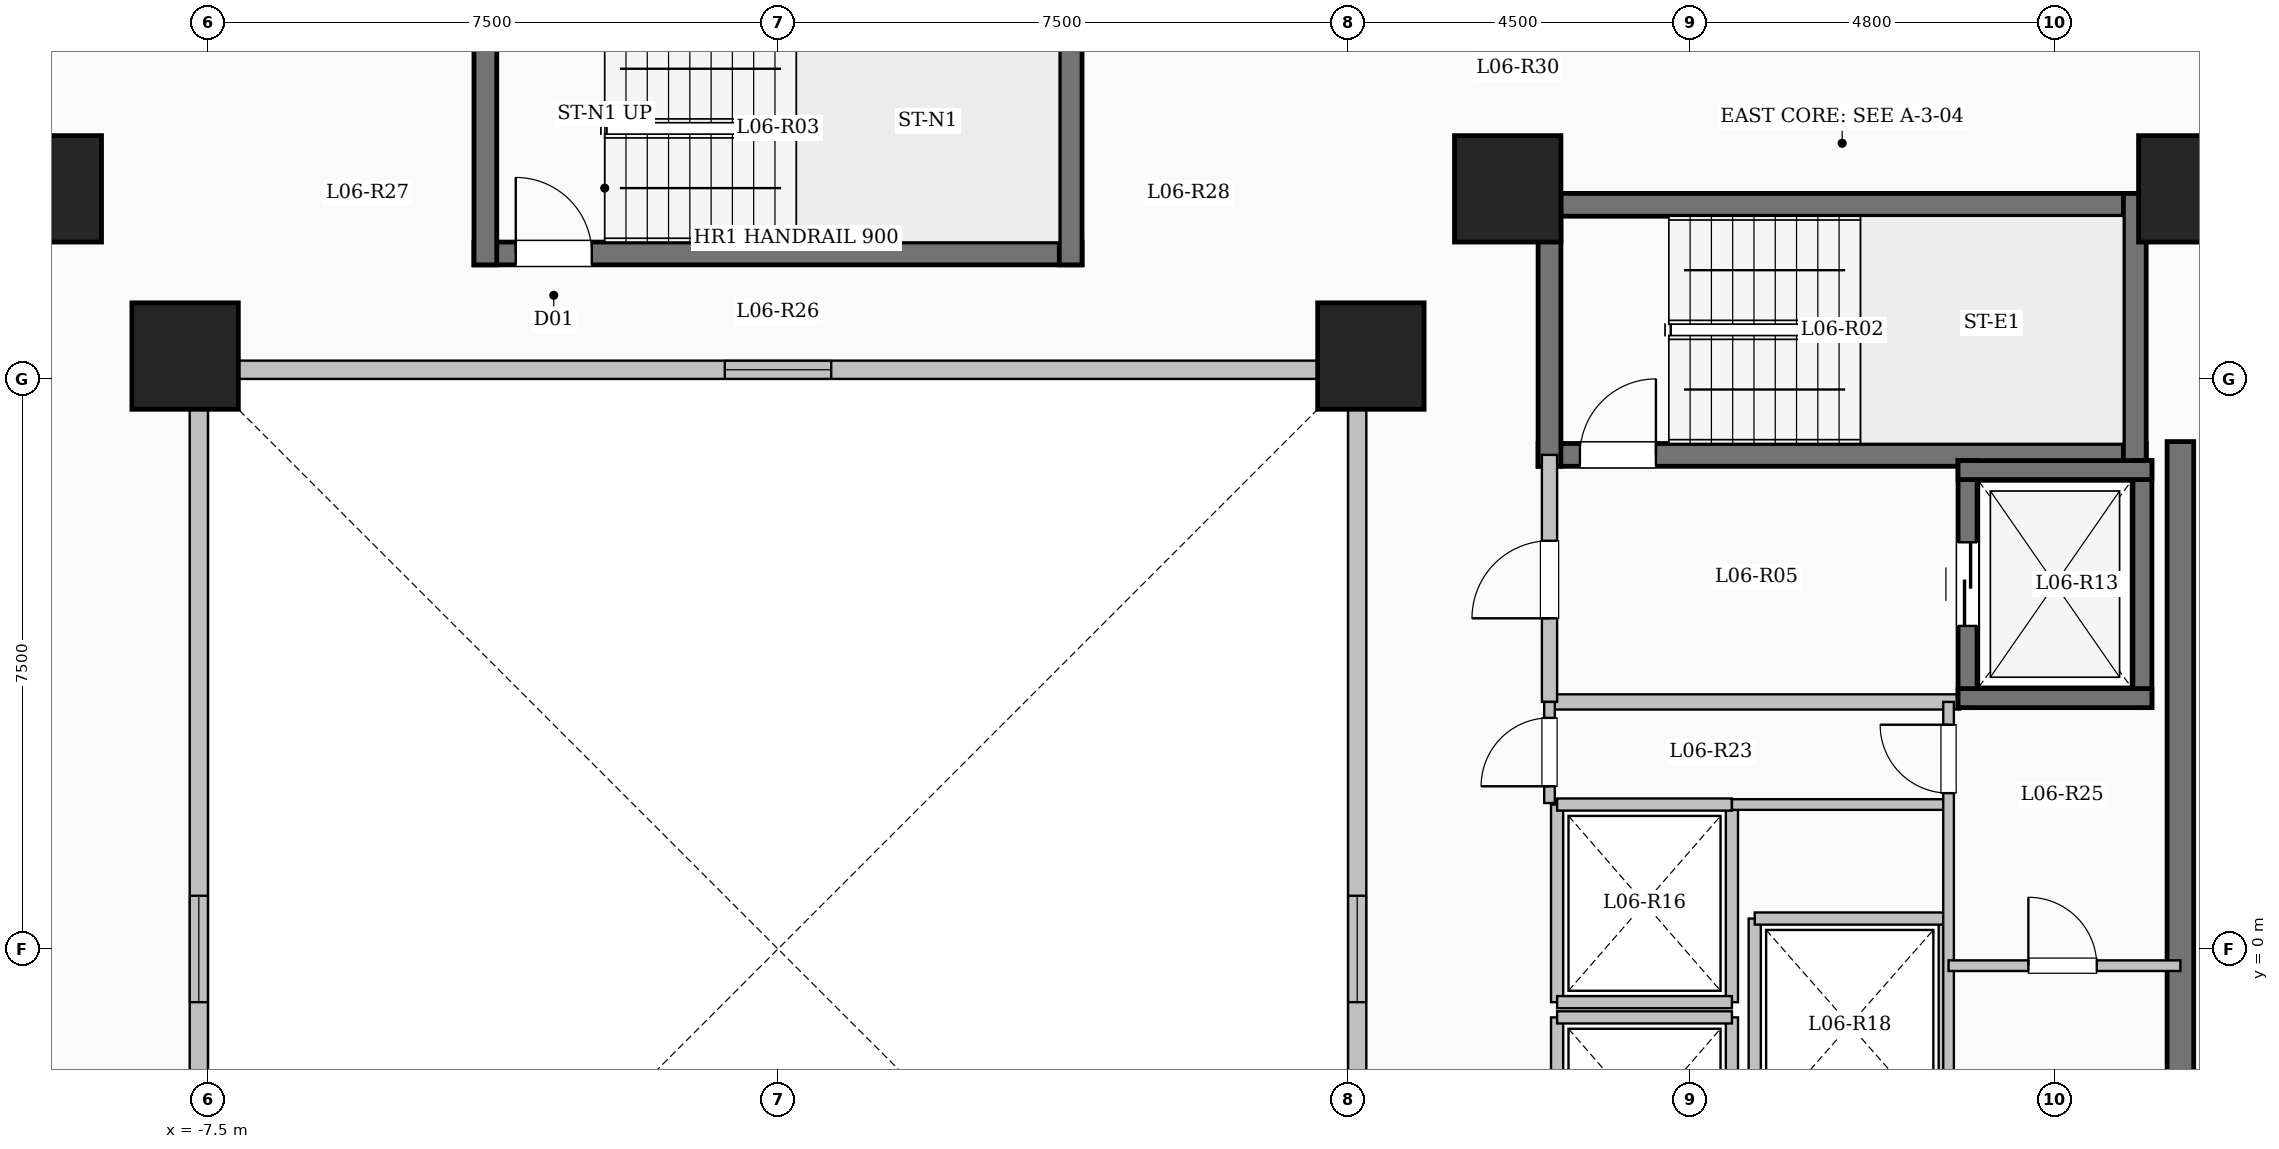
"""IFC4 building model, lengths in metres.
Left out: names, types, materials, properties, quantities, classifications, styles, units other than length and angle.
Written with IfcOpenShell. Run it as: python <this file> out.ifc"""

import sys

from ifc_helpers import new_model, si_unit, direction, frame, frame_2d, origin, origin_2d, place, context, subcontext, project, spatial, rectangle, extrude, element, fill, save


model = new_model("IFC4")
c1 = context("Model", 3, precision=1e-05, world=origin(), true_north=direction((0.0, 1.0)))
c2 = subcontext(c1, "Body", "Model", "MODEL_VIEW")
j1 = project(units=[si_unit("LENGTHUNIT", "METRE"), si_unit("PLANEANGLEUNIT", "RADIAN")], contexts=[c1])
p1 = place(None, origin())
s1 = spatial("IfcSite", under=j1, at=p1, CompositionType="ELEMENT")
p2 = place(p1, origin())
s2 = spatial("IfcBuilding", under=s1, at=p2, CompositionType="ELEMENT")
p3 = place(p2, frame((0.0, 0.0, 27.35)))
s3 = spatial("IfcBuildingStorey", under=s2, at=p3, CompositionType="ELEMENT", Elevation=27.35)
for number, where, z_axis, x_axis in (
    (1, (-7.8, 7.8, 0.0), (0.0, 0.0, 1.0), (1.0, 0.0, 0.0)),
    (2, (7.8, 7.8, 0.0), (0.0, 0.0, 1.0), (1.0, 0.0, 0.0)),
    (3, (-9.6, 10.0, 0.0), (0.0, 0.0, 1.0), (1.0, 0.0, 0.0)),
    (4, (9.6, 10.0, 0.0), (0.0, 0.0, 1.0), (1.0, 0.0, 0.0)),
    (5, (18.6, 10.0, 0.0), (0.0, 0.0, 1.0), (1.0, 0.0, 0.0)),
):
    element("IfcColumn", number, at=place(p3, frame(where, z_axis=z_axis, x_axis=x_axis)), inside=s3, PredefinedType="COLUMN", context=c2, shape_type="SweptSolid", body=[
        extrude(rectangle(XDim=1.4, YDim=1.4, at=origin_2d()), origin(), (0.0, 0.0, 1.0), 3.35),
    ])
p4 = place(p3, frame((7.62, -7.62, 0.0), z_axis=(0.0, 0.0, 1.0), x_axis=(0.0, 1.0, 0.0)))
e6 = element("IfcWall", 6, at=p4, inside=s3, PredefinedType="SOLIDWALL", context=c2, shape_type="SweptSolid", body=[
    extrude(rectangle(XDim=15.24, YDim=0.24, at=frame_2d((7.62, 0.0))), origin(), (0.0, 0.0, 1.0), 3.1),
])
p5 = place(p4, frame((6.92, 0.0, 0.95)))
e7 = element("IfcOpeningElement", 7, at=p5, cuts=e6, PredefinedType="OPENING", context=c2, shape_type="SweptSolid", body=[
    extrude(rectangle(XDim=1.4, YDim=1.5, at=frame_2d((0.7, 0.75))), frame((0.0, 0.13, 0.0), z_axis=(0.0, -1.0, 0.0), x_axis=(1.0, 0.0, 0.0)), (0.0, 0.0, 1.0), 0.26),
])
p6 = place(p3, frame((7.62, 7.62, 0.0), z_axis=(0.0, 0.0, 1.0), x_axis=(-1.0, 0.0, 0.0)))
e8 = element("IfcWall", 8, at=p6, inside=s3, PredefinedType="SOLIDWALL", context=c2, shape_type="SweptSolid", body=[
    extrude(rectangle(XDim=15.24, YDim=0.24, at=frame_2d((7.62, 0.0))), origin(), (0.0, 0.0, 1.0), 3.1),
])
p7 = place(p6, frame((6.92, 0.0, 0.95)))
e9 = element("IfcOpeningElement", 9, at=p7, cuts=e8, PredefinedType="OPENING", context=c2, shape_type="SweptSolid", body=[
    extrude(rectangle(XDim=1.4, YDim=1.5, at=frame_2d((0.7, 0.75))), frame((0.0, 0.13, 0.0), z_axis=(0.0, -1.0, 0.0), x_axis=(1.0, 0.0, 0.0)), (0.0, 0.0, 1.0), 0.26),
])
p8 = place(p3, frame((-7.62, 7.62, 0.0), z_axis=(0.0, 0.0, 1.0), x_axis=(0.0, -1.0, 0.0)))
e10 = element("IfcWall", 10, at=p8, inside=s3, PredefinedType="SOLIDWALL", context=c2, shape_type="SweptSolid", body=[
    extrude(rectangle(XDim=15.24, YDim=0.24, at=frame_2d((7.62, 0.0))), origin(), (0.0, 0.0, 1.0), 3.1),
])
p9 = place(p8, frame((6.92, 0.0, 0.95)))
e11 = element("IfcOpeningElement", 11, at=p9, cuts=e10, PredefinedType="OPENING", context=c2, shape_type="SweptSolid", body=[
    extrude(rectangle(XDim=1.4, YDim=1.5, at=frame_2d((0.7, 0.75))), frame((0.0, 0.13, 0.0), z_axis=(0.0, -1.0, 0.0), x_axis=(1.0, 0.0, 0.0)), (0.0, 0.0, 1.0), 0.26),
])
p10 = place(p3, frame((10.0, 9.79, 0.0), z_axis=(0.0, 0.0, 1.0), x_axis=(1.0, 0.0, 0.0)))
e12 = element("IfcWall", 12, at=p10, inside=s3, PredefinedType="SHEAR", context=c2, shape_type="SweptSolid", body=[
    extrude(rectangle(XDim=8.0, YDim=0.3, at=frame_2d((4.0, 0.0))), origin(), (0.0, 0.0, 1.0), 3.35),
])
p11 = place(p3, frame((10.0, 6.5, 0.0), z_axis=(0.0, 0.0, 1.0), x_axis=(1.0, 0.0, 0.0)))
e13 = element("IfcWall", 13, at=p11, inside=s3, PredefinedType="SHEAR", context=c2, shape_type="SweptSolid", body=[
    extrude(rectangle(XDim=8.0, YDim=0.3, at=frame_2d((4.0, 0.0))), origin(), (0.0, 0.0, 1.0), 3.35),
])
p12 = place(p11, frame((0.55, 0.0, 0.0)))
e14 = element("IfcOpeningElement", 14, at=p12, cuts=e13, PredefinedType="OPENING", context=c2, shape_type="SweptSolid", body=[
    extrude(rectangle(XDim=1.0, YDim=2.15, at=frame_2d((0.5, 1.075))), frame((0.0, 0.16, 0.0), z_axis=(0.0, -1.0, 0.0), x_axis=(1.0, 0.0, 0.0)), (0.0, 0.0, 1.0), 0.32),
])
for number, where, z_axis, x_axis in (
    (15, (10.15, 6.35, 0.0), (0.0, 0.0, 1.0), (0.0, 1.0, 0.0)),
    (16, (17.85, 6.35, 0.0), (0.0, 0.0, 1.0), (0.0, 1.0, 0.0)),
):
    element("IfcWall", number, at=place(p3, frame(where, z_axis=z_axis, x_axis=x_axis)), inside=s3, PredefinedType="SHEAR", context=c2, shape_type="SweptSolid", body=[
        extrude(rectangle(XDim=3.59, YDim=0.3, at=frame_2d((1.795, 0.0))), origin(), (0.0, 0.0, 1.0), 3.35),
    ])
p13 = place(p3, frame((-4.0, 9.15, 0.0), z_axis=(0.0, 0.0, 1.0), x_axis=(1.0, 0.0, 0.0)))
e17 = element("IfcWall", 17, at=p13, inside=s3, PredefinedType="SHEAR", context=c2, shape_type="SweptSolid", body=[
    extrude(rectangle(XDim=8.0, YDim=0.3, at=frame_2d((4.0, 0.0))), origin(), (0.0, 0.0, 1.0), 3.35),
])
p14 = place(p13, frame((0.55, 0.0, 0.0)))
e18 = element("IfcOpeningElement", 18, at=p14, cuts=e17, PredefinedType="OPENING", context=c2, shape_type="SweptSolid", body=[
    extrude(rectangle(XDim=1.0, YDim=2.15, at=frame_2d((0.5, 1.075))), frame((0.0, 0.16, 0.0), z_axis=(0.0, -1.0, 0.0), x_axis=(1.0, 0.0, 0.0)), (0.0, 0.0, 1.0), 0.32),
])
for number, where, z_axis, x_axis in (
    (19, (-3.85, 9.0, 0.0), (0.0, 0.0, 1.0), (0.0, 1.0, 0.0)),
    (20, (3.85, 9.0, 0.0), (0.0, 0.0, 1.0), (0.0, 1.0, 0.0)),
):
    element("IfcWall", number, at=place(p3, frame(where, z_axis=z_axis, x_axis=x_axis)), inside=s3, PredefinedType="SHEAR", context=c2, shape_type="SweptSolid", body=[
        extrude(rectangle(XDim=3.59, YDim=0.3, at=frame_2d((1.795, 0.0))), origin(), (0.0, 0.0, 1.0), 3.35),
    ])
p15 = place(p3, frame((10.15, 3.25, 0.0), z_axis=(0.0, 0.0, 1.0), x_axis=(1.0, 0.0, 0.0)))
e21 = element("IfcWall", 21, at=p15, inside=s3, PredefinedType="SOLIDWALL", context=c2, shape_type="SweptSolid", body=[
    extrude(rectangle(XDim=5.4, YDim=0.2, at=frame_2d((2.7, 0.0))), origin(), (0.0, 0.0, 1.0), 3.1),
])
p16 = place(p3, frame((10.15, 3.25, 0.0), z_axis=(0.0, 0.0, 1.0), x_axis=(0.0, 1.0, 0.0)))
e22 = element("IfcWall", 22, at=p16, inside=s3, PredefinedType="SOLIDWALL", context=c2, shape_type="SweptSolid", body=[
    extrude(rectangle(XDim=3.25, YDim=0.2, at=frame_2d((1.625, 0.0))), origin(), (0.0, 0.0, 1.0), 3.1),
])
p17 = place(p16, frame((1.1, 0.0, 0.0)))
e23 = element("IfcOpeningElement", 23, at=p17, cuts=e22, PredefinedType="OPENING", context=c2, shape_type="SweptSolid", body=[
    extrude(rectangle(XDim=1.02, YDim=2.15, at=frame_2d((0.51, 1.075))), frame((0.0, 0.11, 0.0), z_axis=(0.0, -1.0, 0.0), x_axis=(1.0, 0.0, 0.0)), (0.0, 0.0, 1.0), 0.22),
])
p18 = place(p3, frame((15.65, 3.175, 0.0), z_axis=(0.0, 0.0, 1.0), x_axis=(0.0, 1.0, 0.0)))
e24 = element("IfcWall", 24, at=p18, inside=s3, PredefinedType="SHEAR", context=c2, shape_type="SweptSolid", body=[
    extrude(rectangle(XDim=3.25, YDim=0.25, at=frame_2d((1.625, 0.0))), origin(), (0.0, 0.0, 1.0), 3.35),
])
p19 = place(p18, frame((1.075, 0.0, 0.0)))
e25 = element("IfcOpeningElement", 25, at=p19, cuts=e24, PredefinedType="OPENING", context=c2, shape_type="SweptSolid", body=[
    extrude(rectangle(XDim=1.1, YDim=2.15, at=frame_2d((0.55, 1.075))), frame((0.0, 0.135, 0.0), z_axis=(0.0, -1.0, 0.0), x_axis=(1.0, 0.0, 0.0)), (0.0, 0.0, 1.0), 0.27),
])
p20 = place(p3, frame((17.95, 3.175, 0.0), z_axis=(0.0, 0.0, 1.0), x_axis=(0.0, 1.0, 0.0)))
e26 = element("IfcWall", 26, at=p20, inside=s3, PredefinedType="SHEAR", context=c2, shape_type="SweptSolid", body=[
    extrude(rectangle(XDim=3.25, YDim=0.25, at=frame_2d((1.625, 0.0))), origin(), (0.0, 0.0, 1.0), 3.35),
])
for number, where, z_axis, x_axis in (
    (27, (15.525, 3.3, 0.0), (0.0, 0.0, 1.0), (1.0, 0.0, 0.0)),
    (28, (15.525, 6.3, 0.0), (0.0, 0.0, 1.0), (1.0, 0.0, 0.0)),
):
    element("IfcWall", number, at=place(p3, frame(where, z_axis=z_axis, x_axis=x_axis)), inside=s3, PredefinedType="SHEAR", context=c2, shape_type="SweptSolid", body=[
        extrude(rectangle(XDim=2.55, YDim=0.25, at=frame_2d((1.275, 0.0))), origin(), (0.0, 0.0, 1.0), 3.35),
    ])
for number, where, z_axis, x_axis in (
    (29, (10.25, -3.5, 0.0), (0.0, 0.0, 1.0), (0.0, 1.0, 0.0)),
    (30, (12.55, -3.5, 0.0), (0.0, 0.0, 1.0), (0.0, 1.0, 0.0)),
):
    element("IfcWall", number, at=place(p3, frame(where, z_axis=z_axis, x_axis=x_axis)), inside=s3, PredefinedType="SOLIDWALL", context=c2, shape_type="SweptSolid", body=[
        extrude(rectangle(XDim=2.6, YDim=0.16, at=frame_2d((1.3, 0.0))), origin(), (0.0, 0.0, 1.0), 3.1),
    ])
p21 = place(p3, frame((10.25, -0.9, 0.0), z_axis=(0.0, 0.0, 1.0), x_axis=(1.0, 0.0, 0.0)))
e31 = element("IfcWall", 31, at=p21, inside=s3, PredefinedType="SOLIDWALL", context=c2, shape_type="SweptSolid", body=[
    extrude(rectangle(XDim=2.3, YDim=0.16, at=frame_2d((1.15, 0.0))), origin(), (0.0, 0.0, 1.0), 3.1),
])
for number, where, z_axis, x_axis in (
    (32, (10.25, -0.7, 0.0), (0.0, 0.0, 1.0), (0.0, 1.0, 0.0)),
    (33, (12.55, -0.7, 0.0), (0.0, 0.0, 1.0), (0.0, 1.0, 0.0)),
):
    element("IfcWall", number, at=place(p3, frame(where, z_axis=z_axis, x_axis=x_axis)), inside=s3, PredefinedType="SOLIDWALL", context=c2, shape_type="SweptSolid", body=[
        extrude(rectangle(XDim=2.6, YDim=0.16, at=frame_2d((1.3, 0.0))), origin(), (0.0, 0.0, 1.0), 3.1),
    ])
for number, where, z_axis, x_axis in (
    (34, (10.25, -0.7, 0.0), (0.0, 0.0, 1.0), (1.0, 0.0, 0.0)),
    (35, (10.25, 1.9, 0.0), (0.0, 0.0, 1.0), (1.0, 0.0, 0.0)),
):
    element("IfcWall", number, at=place(p3, frame(where, z_axis=z_axis, x_axis=x_axis)), inside=s3, PredefinedType="SOLIDWALL", context=c2, shape_type="SweptSolid", body=[
        extrude(rectangle(XDim=2.3, YDim=0.16, at=frame_2d((1.15, 0.0))), origin(), (0.0, 0.0, 1.0), 3.1),
    ])
for number, where, z_axis, x_axis in (
    (36, (12.85, -2.4, 0.0), (0.0, 0.0, 1.0), (0.0, 1.0, 0.0)),
    (37, (15.35, -2.4, 0.0), (0.0, 0.0, 1.0), (0.0, 1.0, 0.0)),
):
    element("IfcWall", number, at=place(p3, frame(where, z_axis=z_axis, x_axis=x_axis)), inside=s3, PredefinedType="SOLIDWALL", context=c2, shape_type="SweptSolid", body=[
        extrude(rectangle(XDim=2.8, YDim=0.16, at=frame_2d((1.4, 0.0))), origin(), (0.0, 0.0, 1.0), 3.1),
    ])
p22 = place(p3, frame((12.85, 0.4, 0.0), z_axis=(0.0, 0.0, 1.0), x_axis=(1.0, 0.0, 0.0)))
e38 = element("IfcWall", 38, at=p22, inside=s3, PredefinedType="SOLIDWALL", context=c2, shape_type="SweptSolid", body=[
    extrude(rectangle(XDim=2.5, YDim=0.16, at=frame_2d((1.25, 0.0))), origin(), (0.0, 0.0, 1.0), 3.1),
])
p23 = place(p3, frame((18.45, -7.375, 0.0), z_axis=(0.0, 0.0, 1.0), x_axis=(0.0, 1.0, 0.0)))
e39 = element("IfcWall", 39, at=p23, inside=s3, PredefinedType="SHEAR", context=c2, shape_type="SweptSolid", body=[
    extrude(rectangle(XDim=14.05, YDim=0.35, at=frame_2d((7.025, 0.0))), origin(), (0.0, 0.0, 1.0), 3.35),
])
p24 = place(p3, frame((12.55, 1.9, 0.0), z_axis=(0.0, 0.0, 1.0), x_axis=(1.0, 0.0, 0.0)))
e40 = element("IfcWall", 40, at=p24, inside=s3, PredefinedType="PARTITIONING", context=c2, shape_type="SweptSolid", body=[
    extrude(rectangle(XDim=2.85, YDim=0.14, at=frame_2d((1.425, 0.0))), origin(), (0.0, 0.0, 1.0), 3.1),
])
p25 = place(p3, frame((10.15, 1.92, 0.0), z_axis=(0.0, 0.0, 1.0), x_axis=(0.0, 1.0, 0.0)))
e41 = element("IfcWall", 41, at=p25, inside=s3, PredefinedType="PARTITIONING", context=c2, shape_type="SweptSolid", body=[
    extrude(rectangle(XDim=1.33, YDim=0.14, at=frame_2d((0.665, 0.0))), origin(), (0.0, 0.0, 1.0), 3.1),
])
p26 = place(p25, frame((0.22, 0.0, 0.0)))
e42 = element("IfcOpeningElement", 42, at=p26, cuts=e41, PredefinedType="OPENING", context=c2, shape_type="SweptSolid", body=[
    extrude(rectangle(XDim=0.9, YDim=2.08, at=frame_2d((0.45, 1.04))), frame((0.0, 0.08, 0.0), z_axis=(0.0, -1.0, 0.0), x_axis=(1.0, 0.0, 0.0)), (0.0, 0.0, 1.0), 0.16),
])
p27 = place(p3, frame((15.4, -7.2, 0.0), z_axis=(0.0, 0.0, 1.0), x_axis=(0.0, 1.0, 0.0)))
e43 = element("IfcWall", 43, at=p27, inside=s3, PredefinedType="PARTITIONING", context=c2, shape_type="SweptSolid", body=[
    extrude(rectangle(XDim=10.45, YDim=0.14, at=frame_2d((5.225, 0.0))), origin(), (0.0, 0.0, 1.0), 3.1),
])
p28 = place(p27, frame((9.25, 0.0, 0.0)))
e44 = element("IfcOpeningElement", 44, at=p28, cuts=e43, PredefinedType="OPENING", context=c2, shape_type="SweptSolid", body=[
    extrude(rectangle(XDim=0.9, YDim=2.08, at=frame_2d((0.45, 1.04))), frame((0.0, 0.08, 0.0), z_axis=(0.0, -1.0, 0.0), x_axis=(1.0, 0.0, 0.0)), (0.0, 0.0, 1.0), 0.16),
])
p29 = place(p3, frame((15.4, -0.22, 0.0), z_axis=(0.0, 0.0, 1.0), x_axis=(1.0, 0.0, 0.0)))
e45 = element("IfcWall", 45, at=p29, inside=s3, PredefinedType="PARTITIONING", context=c2, shape_type="SweptSolid", body=[
    extrude(rectangle(XDim=3.05, YDim=0.14, at=frame_2d((1.525, 0.0))), origin(), (0.0, 0.0, 1.0), 3.1),
])
p30 = place(p29, frame((1.05, 0.0, 0.0)))
e46 = element("IfcOpeningElement", 46, at=p30, cuts=e45, PredefinedType="OPENING", context=c2, shape_type="SweptSolid", body=[
    extrude(rectangle(XDim=0.9, YDim=2.08, at=frame_2d((0.45, 1.04))), frame((0.0, 0.08, 0.0), z_axis=(0.0, -1.0, 0.0), x_axis=(1.0, 0.0, 0.0)), (0.0, 0.0, 1.0), 0.16),
])
p31 = place(p5, origin())
e47 = element("IfcWindow", 47, at=p31, inside=s3, PartitioningType="SINGLE_PANEL", PredefinedType="WINDOW", context=c2, shape_type="SweptSolid", body=[
    extrude(rectangle(XDim=1.4, YDim=1.5, at=frame_2d((0.7, 0.75))), frame((0.0, 0.03, 0.0), z_axis=(0.0, -1.0, 0.0), x_axis=(1.0, 0.0, 0.0)), (0.0, 0.0, 1.0), 0.06),
])
fill(e7, e47)
p32 = place(p7, origin())
e48 = element("IfcWindow", 48, at=p32, inside=s3, PartitioningType="SINGLE_PANEL", PredefinedType="WINDOW", context=c2, shape_type="SweptSolid", body=[
    extrude(rectangle(XDim=1.4, YDim=1.5, at=frame_2d((0.7, 0.75))), frame((0.0, 0.03, 0.0), z_axis=(0.0, -1.0, 0.0), x_axis=(1.0, 0.0, 0.0)), (0.0, 0.0, 1.0), 0.06),
])
fill(e9, e48)
p33 = place(p9, origin())
e49 = element("IfcWindow", 49, at=p33, inside=s3, PartitioningType="SINGLE_PANEL", PredefinedType="WINDOW", context=c2, shape_type="SweptSolid", body=[
    extrude(rectangle(XDim=1.4, YDim=1.5, at=frame_2d((0.7, 0.75))), frame((0.0, 0.03, 0.0), z_axis=(0.0, -1.0, 0.0), x_axis=(1.0, 0.0, 0.0)), (0.0, 0.0, 1.0), 0.06),
])
fill(e11, e49)
p34 = place(p12, origin())
e50 = element("IfcDoor", 50, at=p34, inside=s3, OperationType="SINGLE_SWING_RIGHT", PredefinedType="DOOR", context=c2, shape_type="SweptSolid", body=[
    extrude(rectangle(XDim=1.0, YDim=2.15, at=frame_2d((0.5, 1.075))), frame((0.0, 0.025, 0.0), z_axis=(0.0, -1.0, 0.0), x_axis=(1.0, 0.0, 0.0)), (0.0, 0.0, 1.0), 0.05),
])
fill(e14, e50)
p35 = place(p14, origin())
e51 = element("IfcDoor", 51, at=p35, inside=s3, OperationType="SINGLE_SWING_LEFT", PredefinedType="DOOR", context=c2, shape_type="SweptSolid", body=[
    extrude(rectangle(XDim=1.0, YDim=2.15, at=frame_2d((0.5, 1.075))), frame((0.0, 0.025, 0.0), z_axis=(0.0, -1.0, 0.0), x_axis=(1.0, 0.0, 0.0)), (0.0, 0.0, 1.0), 0.05),
])
fill(e18, e51)
p36 = place(p17, origin())
e52 = element("IfcDoor", 52, at=p36, inside=s3, OperationType="SINGLE_SWING_LEFT", PredefinedType="DOOR", context=c2, shape_type="SweptSolid", body=[
    extrude(rectangle(XDim=1.02, YDim=2.15, at=frame_2d((0.51, 1.075))), frame((0.0, 0.025, 0.0), z_axis=(0.0, -1.0, 0.0), x_axis=(1.0, 0.0, 0.0)), (0.0, 0.0, 1.0), 0.05),
])
fill(e23, e52)
p37 = place(p19, origin())
e53 = element("IfcDoor", 53, at=p37, inside=s3, OperationType="SLIDING_TO_LEFT", PredefinedType="DOOR", context=c2, shape_type="SweptSolid", body=[
    extrude(rectangle(XDim=1.1, YDim=2.15, at=frame_2d((0.55, 1.075))), frame((0.0, 0.025, 0.0), z_axis=(0.0, -1.0, 0.0), x_axis=(1.0, 0.0, 0.0)), (0.0, 0.0, 1.0), 0.05),
])
fill(e25, e53)
p38 = place(p26, origin())
e54 = element("IfcDoor", 54, at=p38, inside=s3, OperationType="SINGLE_SWING_LEFT", PredefinedType="DOOR", context=c2, shape_type="SweptSolid", body=[
    extrude(rectangle(XDim=0.9, YDim=2.08, at=frame_2d((0.45, 1.04))), frame((0.0, 0.025, 0.0), z_axis=(0.0, -1.0, 0.0), x_axis=(1.0, 0.0, 0.0)), (0.0, 0.0, 1.0), 0.05),
])
fill(e42, e54)
p39 = place(p28, origin())
e55 = element("IfcDoor", 55, at=p39, inside=s3, OperationType="SINGLE_SWING_RIGHT", PredefinedType="DOOR", context=c2, shape_type="SweptSolid", body=[
    extrude(rectangle(XDim=0.9, YDim=2.08, at=frame_2d((0.45, 1.04))), frame((0.0, 0.025, 0.0), z_axis=(0.0, -1.0, 0.0), x_axis=(1.0, 0.0, 0.0)), (0.0, 0.0, 1.0), 0.05),
])
fill(e44, e55)
p40 = place(p30, origin())
e56 = element("IfcDoor", 56, at=p40, inside=s3, OperationType="SINGLE_SWING_LEFT", PredefinedType="DOOR", context=c2, shape_type="SweptSolid", body=[
    extrude(rectangle(XDim=0.9, YDim=2.08, at=frame_2d((0.45, 1.04))), frame((0.0, 0.025, 0.0), z_axis=(0.0, -1.0, 0.0), x_axis=(1.0, 0.0, 0.0)), (0.0, 0.0, 1.0), 0.05),
])
fill(e46, e56)
save(model, sys.argv[1])
